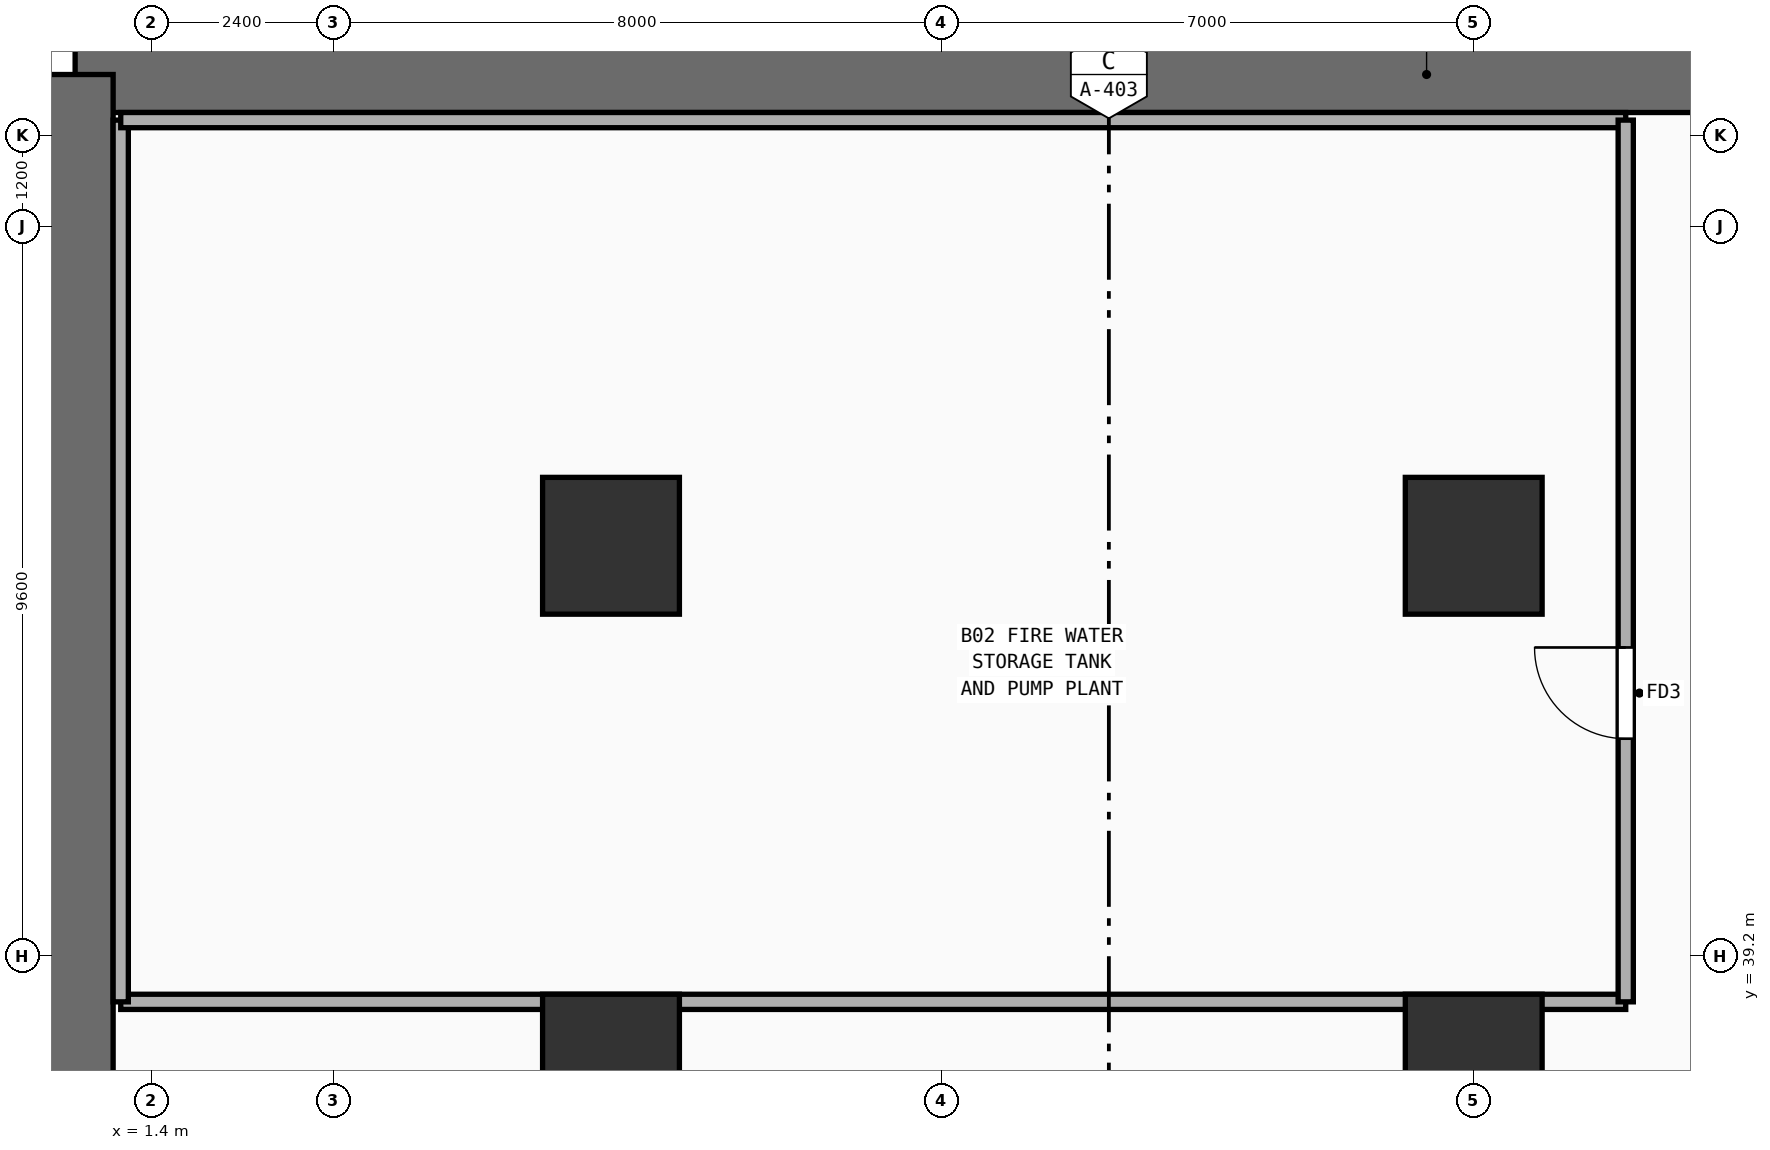
"""IFC4 building model, lengths in metres.
Left out: names, types, materials, properties, quantities, classifications, styles, units other than length and angle.
Written with IfcOpenShell. Run it as: python <this file> out.ifc"""

import sys

from ifc_helpers import new_model, si_unit, direction, frame, frame_2d, origin, origin_2d, place, context, subcontext, project, spatial, rectangle, extrude, element, fill, save


model = new_model("IFC4")
c1 = context("Model", 3, precision=1e-05, world=origin(), true_north=direction((0.0, 1.0)))
c2 = subcontext(c1, "Body", "Model", "MODEL_VIEW")
j1 = project(units=[si_unit("LENGTHUNIT", "METRE"), si_unit("PLANEANGLEUNIT", "RADIAN")], contexts=[c1])
p1 = place(None, origin())
s1 = spatial("IfcSite", under=j1, at=p1, CompositionType="ELEMENT")
p2 = place(p1, origin())
s2 = spatial("IfcBuilding", under=s1, at=p2, CompositionType="ELEMENT")
p3 = place(p2, frame((0.0, 0.0, -8.4)))
s3 = spatial("IfcBuildingStorey", under=s2, at=p3, CompositionType="ELEMENT", Elevation=-8.4)
p4 = place(p3, frame((64.4, 50.8, 0.0), z_axis=(0.0, 0.0, 1.0), x_axis=(-1.0, 0.0, 0.0)))
e1 = element("IfcWall", 1, at=p4, inside=s3, PredefinedType="USERDEFINED", context=c2, shape_type="SweptSolid", body=[
    extrude(rectangle(XDim=64.0, YDim=1.0, at=frame_2d((32.0, 0.0))), origin(), (0.0, 0.0, 1.0), 3.86),
])
p5 = place(p3, frame((0.4, 50.8, 0.0), z_axis=(0.0, 0.0, 1.0), x_axis=(0.0, -1.0, 0.0)))
e2 = element("IfcWall", 2, at=p5, inside=s3, PredefinedType="USERDEFINED", context=c2, shape_type="SweptSolid", body=[
    extrude(rectangle(XDim=50.4, YDim=1.0, at=frame_2d((25.2, 0.0))), origin(), (0.0, 0.0, 1.0), 3.86),
])
for number, where, z_axis, x_axis in (
    (3, (7.45, 37.8, 0.0), (0.0, 0.0, 1.0), (1.0, 0.0, 0.0)),
    (4, (7.45, 44.6, 0.0), (0.0, 0.0, 1.0), (1.0, 0.0, 0.0)),
    (5, (18.8, 37.8, 0.0), (0.0, 0.0, 1.0), (1.0, 0.0, 0.0)),
    (6, (18.8, 44.6, 0.0), (0.0, 0.0, 1.0), (1.0, 0.0, 0.0)),
):
    element("IfcColumn", number, at=place(p3, frame(where, z_axis=z_axis, x_axis=x_axis)), inside=s3, PredefinedType="COLUMN", context=c2, shape_type="SweptSolid", body=[
        extrude(rectangle(XDim=1.8, YDim=1.8, at=origin_2d()), origin(), (0.0, 0.0, 1.0), 3.86),
    ])
p6 = place(p3, frame((1.0, 38.6, 0.0), z_axis=(0.0, 0.0, 1.0), x_axis=(1.0, 0.0, 0.0)))
e7 = element("IfcWall", 7, at=p6, inside=s3, PredefinedType="PARTITIONING", context=c2, shape_type="SweptSolid", body=[
    extrude(rectangle(XDim=19.8, YDim=0.2, at=frame_2d((9.9, 0.0))), origin(), (0.0, 0.0, 1.0), 3.86),
])
p7 = place(p3, frame((1.0, 38.6, 0.0), z_axis=(0.0, 0.0, 1.0), x_axis=(0.0, 1.0, 0.0)))
e8 = element("IfcWall", 8, at=p7, inside=s3, PredefinedType="PARTITIONING", context=c2, shape_type="SweptSolid", body=[
    extrude(rectangle(XDim=11.6, YDim=0.2, at=frame_2d((5.8, 0.0))), origin(), (0.0, 0.0, 1.0), 3.86),
])
p8 = place(p3, frame((1.0, 50.2, 0.0), z_axis=(0.0, 0.0, 1.0), x_axis=(1.0, 0.0, 0.0)))
e9 = element("IfcWall", 9, at=p8, inside=s3, PredefinedType="PARTITIONING", context=c2, shape_type="SweptSolid", body=[
    extrude(rectangle(XDim=19.8, YDim=0.2, at=frame_2d((9.9, 0.0))), origin(), (0.0, 0.0, 1.0), 3.86),
])
p9 = place(p3, frame((20.8, 38.6, 0.0), z_axis=(0.0, 0.0, 1.0), x_axis=(0.0, 1.0, 0.0)))
e10 = element("IfcWall", 10, at=p9, inside=s3, PredefinedType="PARTITIONING", context=c2, shape_type="SweptSolid", body=[
    extrude(rectangle(XDim=11.6, YDim=0.2, at=frame_2d((5.8, 0.0))), origin(), (0.0, 0.0, 1.0), 3.86),
])
p10 = place(p9, frame((3.462, 0.0, 0.0)))
e11 = element("IfcOpeningElement", 11, at=p10, cuts=e10, PredefinedType="OPENING", context=c2, shape_type="SweptSolid", body=[
    extrude(rectangle(XDim=1.2, YDim=2.25, at=frame_2d((0.6, 1.125))), frame((0.0, 0.11, 0.0), z_axis=(0.0, -1.0, 0.0), x_axis=(1.0, 0.0, 0.0)), (0.0, 0.0, 1.0), 0.22),
])
p11 = place(p10, origin())
e12 = element("IfcDoor", 12, at=p11, inside=s3, OperationType="SINGLE_SWING_RIGHT", PredefinedType="DOOR", context=c2, shape_type="SweptSolid", body=[
    extrude(rectangle(XDim=1.2, YDim=2.25, at=frame_2d((0.6, 1.125))), frame((0.0, 0.025, 0.0), z_axis=(0.0, -1.0, 0.0), x_axis=(1.0, 0.0, 0.0)), (0.0, 0.0, 1.0), 0.05),
])
fill(e11, e12)
save(model, sys.argv[1])
